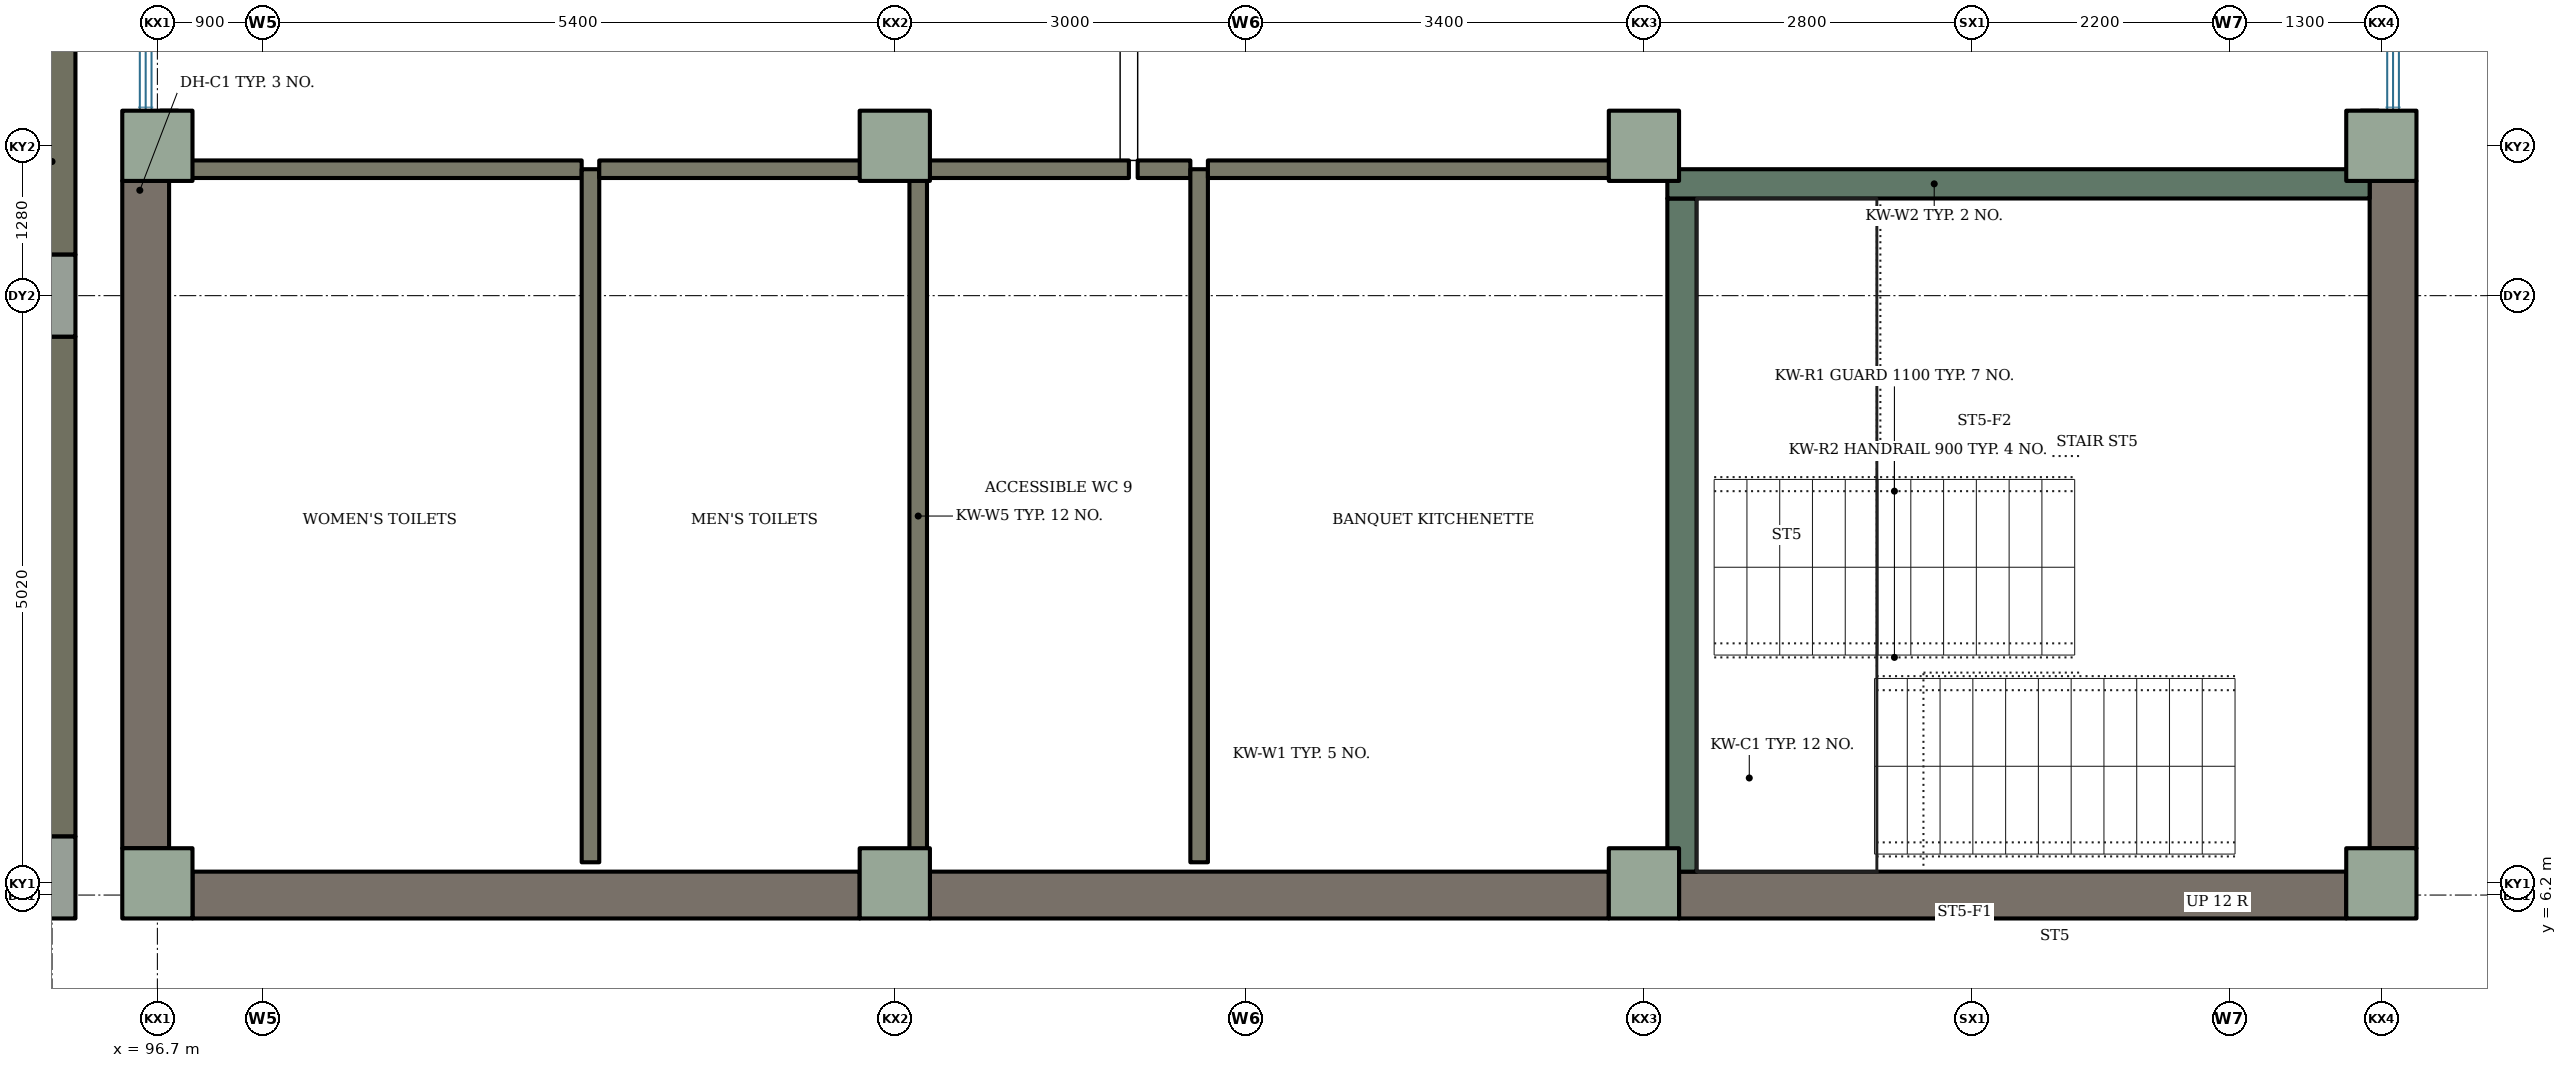
"""IFC4 building model, lengths in metres.
Left out: names, types, materials, properties, quantities, classifications, styles, units other than length and angle.
Written with IfcOpenShell. Run it as: python <this file> out.ifc"""

import sys

from ifc_helpers import new_model, si_unit, direction, frame, frame_2d, origin, origin_2d, place, context, subcontext, project, spatial, rectangle, extrude, element, fill, save


model = new_model("IFC4")
c1 = context("Model", 3, precision=1e-05, world=origin(), true_north=direction((0.0, 1.0)))
c2 = subcontext(c1, "Body", "Model", "MODEL_VIEW")
j1 = project(units=[si_unit("LENGTHUNIT", "METRE"), si_unit("PLANEANGLEUNIT", "RADIAN")], contexts=[c1])
p1 = place(None, origin())
s1 = spatial("IfcSite", under=j1, at=p1, CompositionType="ELEMENT")
p2 = place(p1, origin())
s2 = spatial("IfcBuilding", under=s1, at=p2, CompositionType="ELEMENT")
p3 = place(p2, frame((0.0, 0.0, 4.2)))
s3 = spatial("IfcBuildingStorey", under=s2, at=p3, CompositionType="ELEMENT", Elevation=4.2)
for number, where, z_axis, x_axis in (
    (1, (95.65, 6.35, 0.0), (0.0, 0.0, 1.0), (1.0, 0.0, 0.0)),
    (2, (95.65, 11.32, 0.0), (0.0, 0.0, 1.0), (1.0, 0.0, 0.0)),
):
    element("IfcColumn", number, at=place(p3, frame(where, z_axis=z_axis, x_axis=x_axis)), inside=s3, PredefinedType="COLUMN", context=c2, shape_type="SweptSolid", body=[
        extrude(rectangle(XDim=0.7, YDim=0.7, at=origin_2d()), origin(), (0.0, 0.0, 1.0), 4.2),
    ])
p4 = place(p3, frame((95.8, 6.7, 0.0), z_axis=(0.0, 0.0, 1.0), x_axis=(0.0, 1.0, 0.0)))
e3 = element("IfcWall", 3, at=p4, inside=s3, PredefinedType="SOLIDWALL", context=c2, shape_type="SweptSolid", body=[
    extrude(rectangle(XDim=4.27, YDim=0.4, at=frame_2d((2.135, 0.0))), origin(), (0.0, 0.0, 1.0), 4.2),
])
p5 = place(p4, frame((1.635, 0.0, 0.6)))
e4 = element("IfcOpeningElement", 4, at=p5, cuts=e3, PredefinedType="OPENING", context=c2, shape_type="SweptSolid", body=[
    extrude(rectangle(XDim=1.0, YDim=2.4, at=frame_2d((0.5, 1.2))), frame((0.0, 0.21, 0.0), z_axis=(0.0, -1.0, 0.0), x_axis=(1.0, 0.0, 0.0)), (0.0, 0.0, 1.0), 0.42),
])
p6 = place(p3, frame((95.8, 11.67, 0.0), z_axis=(0.0, 0.0, 1.0), x_axis=(0.0, 1.0, 0.0)))
e5 = element("IfcWall", 5, at=p6, inside=s3, PredefinedType="SOLIDWALL", context=c2, shape_type="SweptSolid", body=[
    extrude(rectangle(XDim=4.42, YDim=0.4, at=frame_2d((2.21, 0.0))), origin(), (0.0, 0.0, 1.0), 4.2),
])
p7 = place(p6, frame((1.71, 0.0, 0.6)))
e6 = element("IfcOpeningElement", 6, at=p7, cuts=e5, PredefinedType="OPENING", context=c2, shape_type="SweptSolid", body=[
    extrude(rectangle(XDim=1.0, YDim=2.4, at=frame_2d((0.5, 1.2))), frame((0.0, 0.21, 0.0), z_axis=(0.0, -1.0, 0.0), x_axis=(1.0, 0.0, 0.0)), (0.0, 0.0, 1.0), 0.42),
])
for number, where, z_axis, x_axis in (
    (7, (96.7, 6.3, 0.0), (0.0, 0.0, 1.0), (1.0, 0.0, 0.0)),
    (8, (96.7, 12.6, 0.0), (0.0, 0.0, 1.0), (1.0, 0.0, 0.0)),
    (9, (103.0, 6.3, 0.0), (0.0, 0.0, 1.0), (1.0, 0.0, 0.0)),
    (10, (103.0, 12.6, 0.0), (0.0, 0.0, 1.0), (1.0, 0.0, 0.0)),
    (11, (109.4, 6.3, 0.0), (0.0, 0.0, 1.0), (1.0, 0.0, 0.0)),
    (12, (109.4, 12.6, 0.0), (0.0, 0.0, 1.0), (1.0, 0.0, 0.0)),
    (13, (115.7, 6.3, 0.0), (0.0, 0.0, 1.0), (1.0, 0.0, 0.0)),
    (14, (115.7, 12.6, 0.0), (0.0, 0.0, 1.0), (1.0, 0.0, 0.0)),
):
    element("IfcColumn", number, at=place(p3, frame(where, z_axis=z_axis, x_axis=x_axis)), inside=s3, PredefinedType="COLUMN", context=c2, shape_type="SweptSolid", body=[
        extrude(rectangle(XDim=0.6, YDim=0.6, at=origin_2d()), origin(), (0.0, 0.0, 1.0), 4.2),
    ])
p8 = place(p3, frame((97.0, 6.2, 0.0), z_axis=(0.0, 0.0, 1.0), x_axis=(1.0, 0.0, 0.0)))
e15 = element("IfcWall", 15, at=p8, inside=s3, PredefinedType="SOLIDWALL", context=c2, shape_type="SweptSolid", body=[
    extrude(rectangle(XDim=5.7, YDim=0.4, at=frame_2d((2.85, 0.0))), origin(), (0.0, 0.0, 1.0), 4.2),
])
p9 = place(p8, frame((1.225, 0.0, 1.4)))
e16 = element("IfcOpeningElement", 16, at=p9, cuts=e15, PredefinedType="OPENING", context=c2, shape_type="SweptSolid", body=[
    extrude(rectangle(XDim=0.75, YDim=1.5, at=frame_2d((0.375, 0.75))), frame((0.0, 0.21, 0.0), z_axis=(0.0, -1.0, 0.0), x_axis=(1.0, 0.0, 0.0)), (0.0, 0.0, 1.0), 0.42),
])
p10 = place(p8, frame((4.425, 0.0, 1.4)))
e17 = element("IfcOpeningElement", 17, at=p10, cuts=e15, PredefinedType="OPENING", context=c2, shape_type="SweptSolid", body=[
    extrude(rectangle(XDim=0.75, YDim=1.5, at=frame_2d((0.375, 0.75))), frame((0.0, 0.21, 0.0), z_axis=(0.0, -1.0, 0.0), x_axis=(1.0, 0.0, 0.0)), (0.0, 0.0, 1.0), 0.42),
])
p11 = place(p3, frame((103.3, 6.2, 0.0), z_axis=(0.0, 0.0, 1.0), x_axis=(1.0, 0.0, 0.0)))
e18 = element("IfcWall", 18, at=p11, inside=s3, PredefinedType="SOLIDWALL", context=c2, shape_type="SweptSolid", body=[
    extrude(rectangle(XDim=5.8, YDim=0.4, at=frame_2d((2.9, 0.0))), origin(), (0.0, 0.0, 1.0), 4.2),
])
p12 = place(p11, frame((1.7, 0.0, 0.9)))
e19 = element("IfcOpeningElement", 19, at=p12, cuts=e18, PredefinedType="OPENING", context=c2, shape_type="SweptSolid", body=[
    extrude(rectangle(XDim=2.4, YDim=2.7, at=frame_2d((1.2, 1.35))), frame((0.0, 0.21, 0.0), z_axis=(0.0, -1.0, 0.0), x_axis=(1.0, 0.0, 0.0)), (0.0, 0.0, 1.0), 0.42),
])
for number, where, z_axis, x_axis in (
    (20, (109.7, 6.2, 0.0), (0.0, 0.0, 1.0), (1.0, 0.0, 0.0)),
    (21, (96.6, 6.6, 0.0), (0.0, 0.0, 1.0), (0.0, 1.0, 0.0)),
):
    element("IfcWall", number, at=place(p3, frame(where, z_axis=z_axis, x_axis=x_axis)), inside=s3, PredefinedType="SOLIDWALL", context=c2, shape_type="SweptSolid", body=[
        extrude(rectangle(XDim=5.7, YDim=0.4, at=frame_2d((2.85, 0.0))), origin(), (0.0, 0.0, 1.0), 4.2),
    ])
p13 = place(p3, frame((115.8, 12.3, 0.0), z_axis=(0.0, 0.0, 1.0), x_axis=(0.0, -1.0, 0.0)))
e22 = element("IfcWall", 22, at=p13, inside=s3, PredefinedType="SOLIDWALL", context=c2, shape_type="SweptSolid", body=[
    extrude(rectangle(XDim=5.7, YDim=0.4, at=frame_2d((2.85, 0.0))), origin(), (0.0, 0.0, 1.0), 4.2),
])
p14 = place(p13, frame((2.35, 0.0, 0.9)))
e23 = element("IfcOpeningElement", 23, at=p14, cuts=e22, PredefinedType="OPENING", context=c2, shape_type="SweptSolid", body=[
    extrude(rectangle(XDim=1.0, YDim=1.5, at=frame_2d((0.5, 0.75))), frame((0.0, 0.21, 0.0), z_axis=(0.0, -1.0, 0.0), x_axis=(1.0, 0.0, 0.0)), (0.0, 0.0, 1.0), 0.42),
])
p15 = place(p3, frame((109.725, 6.4, 0.0), z_axis=(0.0, 0.0, 1.0), x_axis=(0.0, 1.0, 0.0)))
e24 = element("IfcWall", 24, at=p15, inside=s3, PredefinedType="SHEAR", context=c2, shape_type="SweptSolid", body=[
    extrude(rectangle(XDim=5.75, YDim=0.25, at=frame_2d((2.875, 0.0))), origin(), (0.0, 0.0, 1.0), 4.2),
])
p16 = place(p3, frame((109.6, 12.275, 0.0), z_axis=(0.0, 0.0, 1.0), x_axis=(1.0, 0.0, 0.0)))
e25 = element("IfcWall", 25, at=p16, inside=s3, PredefinedType="SHEAR", context=c2, shape_type="SweptSolid", body=[
    extrude(rectangle(XDim=6.0, YDim=0.25, at=frame_2d((3.0, 0.0))), origin(), (0.0, 0.0, 1.0), 4.2),
])
p17 = place(p16, frame((3.75, 0.0, 0.0)))
e26 = element("IfcOpeningElement", 26, at=p17, cuts=e25, PredefinedType="OPENING", context=c2, shape_type="SweptSolid", body=[
    extrude(rectangle(XDim=1.8, YDim=2.1, at=frame_2d((0.9, 1.05))), frame((0.0, 0.135, 0.0), z_axis=(0.0, -1.0, 0.0), x_axis=(1.0, 0.0, 0.0)), (0.0, 0.0, 1.0), 0.27),
])
p18 = place(p3, frame((96.8, 12.9, 0.0), z_axis=(0.0, 0.0, 1.0), x_axis=(0.0, -1.0, 0.0)))
e27 = element("IfcWall", 27, at=p18, inside=s3, PredefinedType="PARTITIONING", context=c2, shape_type="SweptSolid", body=[
    extrude(rectangle(XDim=0.5, YDim=0.15, at=frame_2d((0.25, 0.0))), origin(), (0.0, 0.0, 1.0), 3.92),
])
p19 = place(p3, frame((100.325, 12.4, 0.0), z_axis=(0.0, 0.0, 1.0), x_axis=(-1.0, 0.0, 0.0)))
e28 = element("IfcWall", 28, at=p19, inside=s3, PredefinedType="PARTITIONING", context=c2, shape_type="SweptSolid", body=[
    extrude(rectangle(XDim=3.45, YDim=0.15, at=frame_2d((1.725, 0.0))), origin(), (0.0, 0.0, 1.0), 3.92),
])
p20 = place(p19, frame((1.275, 0.0, 0.0)))
e29 = element("IfcOpeningElement", 29, at=p20, cuts=e28, PredefinedType="OPENING", context=c2, shape_type="SweptSolid", body=[
    extrude(rectangle(XDim=0.9, YDim=2.1, at=frame_2d((0.45, 1.05))), frame((0.0, 0.085, 0.0), z_axis=(0.0, -1.0, 0.0), x_axis=(1.0, 0.0, 0.0)), (0.0, 0.0, 1.0), 0.17),
])
p21 = place(p3, frame((100.4, 6.48, 0.0), z_axis=(0.0, 0.0, 1.0), x_axis=(0.0, 1.0, 0.0)))
e30 = element("IfcWall", 30, at=p21, inside=s3, PredefinedType="PARTITIONING", context=c2, shape_type="SweptSolid", body=[
    extrude(rectangle(XDim=5.92, YDim=0.15, at=frame_2d((2.96, 0.0))), origin(), (0.0, 0.0, 1.0), 3.92),
])
p22 = place(p3, frame((102.78, 6.4, 0.0), z_axis=(0.0, 0.0, 1.0), x_axis=(1.0, 0.0, 0.0)))
e31 = element("IfcWall", 31, at=p22, inside=s3, PredefinedType="PARTITIONING", context=c2, shape_type="SweptSolid", body=[
    extrude(rectangle(XDim=0.42, YDim=0.15, at=frame_2d((0.21, 0.0))), origin(), (0.0, 0.0, 1.0), 3.92),
])
p23 = place(p3, frame((103.125, 12.4, 0.0), z_axis=(0.0, 0.0, 1.0), x_axis=(-1.0, 0.0, 0.0)))
e32 = element("IfcWall", 32, at=p23, inside=s3, PredefinedType="PARTITIONING", context=c2, shape_type="SweptSolid", body=[
    extrude(rectangle(XDim=2.65, YDim=0.15, at=frame_2d((1.325, 0.0))), origin(), (0.0, 0.0, 1.0), 3.92),
])
p24 = place(p23, frame((0.875, 0.0, 0.0)))
e33 = element("IfcOpeningElement", 33, at=p24, cuts=e32, PredefinedType="OPENING", context=c2, shape_type="SweptSolid", body=[
    extrude(rectangle(XDim=0.9, YDim=2.1, at=frame_2d((0.45, 1.05))), frame((0.0, 0.085, 0.0), z_axis=(0.0, -1.0, 0.0), x_axis=(1.0, 0.0, 0.0)), (0.0, 0.0, 1.0), 0.17),
])
p25 = place(p3, frame((103.2, 6.475, 0.0), z_axis=(0.0, 0.0, 1.0), x_axis=(0.0, 1.0, 0.0)))
e34 = element("IfcWall", 34, at=p25, inside=s3, PredefinedType="PARTITIONING", context=c2, shape_type="SweptSolid", body=[
    extrude(rectangle(XDim=5.925, YDim=0.15, at=frame_2d((2.962, 0.0))), origin(), (0.0, 0.0, 1.0), 3.92),
])
p26 = place(p3, frame((105.0, 12.4, 0.0), z_axis=(0.0, 0.0, 1.0), x_axis=(-1.0, 0.0, 0.0)))
e35 = element("IfcWall", 35, at=p26, inside=s3, PredefinedType="PARTITIONING", context=c2, shape_type="SweptSolid", body=[
    extrude(rectangle(XDim=1.725, YDim=0.15, at=frame_2d((0.863, 0.0))), origin(), (0.0, 0.0, 1.0), 3.92),
])
p27 = place(p26, frame((0.45, 0.0, 0.0)))
e36 = element("IfcOpeningElement", 36, at=p27, cuts=e35, PredefinedType="OPENING", context=c2, shape_type="SweptSolid", body=[
    extrude(rectangle(XDim=0.9, YDim=2.1, at=frame_2d((0.45, 1.05))), frame((0.0, 0.085, 0.0), z_axis=(0.0, -1.0, 0.0), x_axis=(1.0, 0.0, 0.0)), (0.0, 0.0, 1.0), 0.17),
])
p28 = place(p3, frame((105.0, 12.475, 0.0), z_axis=(0.0, 0.0, 1.0), x_axis=(0.0, 1.0, 0.0)))
e37 = element("IfcWall", 37, at=p28, inside=s3, PredefinedType="PARTITIONING", context=c2, shape_type="SweptSolid", body=[
    extrude(rectangle(XDim=19.045, YDim=0.15, at=frame_2d((9.522, 0.0))), origin(), (0.0, 0.0, 1.0), 3.92),
])
p29 = place(p28, frame((8.575, 0.0, 0.0)))
e38 = element("IfcOpeningElement", 38, at=p29, cuts=e37, PredefinedType="OPENING", context=c2, shape_type="SweptSolid", body=[
    extrude(rectangle(XDim=1.8, YDim=2.1, at=frame_2d((0.9, 1.05))), frame((0.0, 0.085, 0.0), z_axis=(0.0, -1.0, 0.0), x_axis=(1.0, 0.0, 0.0)), (0.0, 0.0, 1.0), 0.17),
])
p30 = place(p3, frame((105.525, 12.4, 0.0), z_axis=(0.0, 0.0, 1.0), x_axis=(-1.0, 0.0, 0.0)))
e39 = element("IfcWall", 39, at=p30, inside=s3, PredefinedType="PARTITIONING", context=c2, shape_type="SweptSolid", body=[
    extrude(rectangle(XDim=0.45, YDim=0.15, at=frame_2d((0.225, 0.0))), origin(), (0.0, 0.0, 1.0), 3.92),
])
p31 = place(p3, frame((105.6, 6.48, 0.0), z_axis=(0.0, 0.0, 1.0), x_axis=(0.0, 1.0, 0.0)))
e40 = element("IfcWall", 40, at=p31, inside=s3, PredefinedType="PARTITIONING", context=c2, shape_type="SweptSolid", body=[
    extrude(rectangle(XDim=5.92, YDim=0.15, at=frame_2d((2.96, 0.0))), origin(), (0.0, 0.0, 1.0), 3.92),
])
p32 = place(p3, frame((109.18, 6.4, 0.0), z_axis=(0.0, 0.0, 1.0), x_axis=(1.0, 0.0, 0.0)))
e41 = element("IfcWall", 41, at=p32, inside=s3, PredefinedType="PARTITIONING", context=c2, shape_type="SweptSolid", body=[
    extrude(rectangle(XDim=0.34, YDim=0.15, at=frame_2d((0.17, 0.0))), origin(), (0.0, 0.0, 1.0), 3.92),
])
p33 = place(p3, frame((109.52, 12.4, 0.0), z_axis=(0.0, 0.0, 1.0), x_axis=(-1.0, 0.0, 0.0)))
e42 = element("IfcWall", 42, at=p33, inside=s3, PredefinedType="PARTITIONING", context=c2, shape_type="SweptSolid", body=[
    extrude(rectangle(XDim=3.845, YDim=0.15, at=frame_2d((1.922, 0.0))), origin(), (0.0, 0.0, 1.0), 3.92),
])
p34 = place(p33, frame((1.07, 0.0, 0.0)))
e43 = element("IfcOpeningElement", 43, at=p34, cuts=e42, PredefinedType="OPENING", context=c2, shape_type="SweptSolid", body=[
    extrude(rectangle(XDim=1.8, YDim=2.1, at=frame_2d((0.9, 1.05))), frame((0.0, 0.085, 0.0), z_axis=(0.0, -1.0, 0.0), x_axis=(1.0, 0.0, 0.0)), (0.0, 0.0, 1.0), 0.17),
])
p35 = place(p3, frame((115.6, 12.9, 0.0), z_axis=(0.0, 0.0, 1.0), x_axis=(0.0, -1.0, 0.0)))
e44 = element("IfcWall", 44, at=p35, inside=s3, PredefinedType="PARTITIONING", context=c2, shape_type="SweptSolid", body=[
    extrude(rectangle(XDim=0.42, YDim=0.15, at=frame_2d((0.21, 0.0))), origin(), (0.0, 0.0, 1.0), 3.92),
])
p36 = place(p5, origin())
e45 = element("IfcWindow", 45, at=p36, inside=s3, PartitioningType="SINGLE_PANEL", PredefinedType="WINDOW", context=c2, shape_type="SweptSolid", body=[
    extrude(rectangle(XDim=1.0, YDim=2.4, at=frame_2d((0.5, 1.2))), frame((0.0, 0.03, 0.0), z_axis=(0.0, -1.0, 0.0), x_axis=(1.0, 0.0, 0.0)), (0.0, 0.0, 1.0), 0.06),
])
fill(e4, e45)
p37 = place(p7, origin())
e46 = element("IfcWindow", 46, at=p37, inside=s3, PartitioningType="SINGLE_PANEL", PredefinedType="WINDOW", context=c2, shape_type="SweptSolid", body=[
    extrude(rectangle(XDim=1.0, YDim=2.4, at=frame_2d((0.5, 1.2))), frame((0.0, 0.03, 0.0), z_axis=(0.0, -1.0, 0.0), x_axis=(1.0, 0.0, 0.0)), (0.0, 0.0, 1.0), 0.06),
])
fill(e6, e46)
p38 = place(p14, origin())
e47 = element("IfcWindow", 47, at=p38, inside=s3, PartitioningType="SINGLE_PANEL", PredefinedType="WINDOW", context=c2, shape_type="SweptSolid", body=[
    extrude(rectangle(XDim=1.0, YDim=1.5, at=frame_2d((0.5, 0.75))), frame((0.0, 0.03, 0.0), z_axis=(0.0, -1.0, 0.0), x_axis=(1.0, 0.0, 0.0)), (0.0, 0.0, 1.0), 0.06),
])
fill(e23, e47)
p39 = place(p9, origin())
e48 = element("IfcWindow", 48, at=p39, inside=s3, PartitioningType="SINGLE_PANEL", PredefinedType="WINDOW", context=c2, shape_type="SweptSolid", body=[
    extrude(rectangle(XDim=0.75, YDim=1.5, at=frame_2d((0.375, 0.75))), frame((0.0, 0.03, 0.0), z_axis=(0.0, -1.0, 0.0), x_axis=(1.0, 0.0, 0.0)), (0.0, 0.0, 1.0), 0.06),
])
fill(e16, e48)
p40 = place(p10, origin())
e49 = element("IfcWindow", 49, at=p40, inside=s3, PartitioningType="SINGLE_PANEL", PredefinedType="WINDOW", context=c2, shape_type="SweptSolid", body=[
    extrude(rectangle(XDim=0.75, YDim=1.5, at=frame_2d((0.375, 0.75))), frame((0.0, 0.03, 0.0), z_axis=(0.0, -1.0, 0.0), x_axis=(1.0, 0.0, 0.0)), (0.0, 0.0, 1.0), 0.06),
])
fill(e17, e49)
p41 = place(p12, origin())
e50 = element("IfcWindow", 50, at=p41, inside=s3, PartitioningType="SINGLE_PANEL", PredefinedType="WINDOW", context=c2, shape_type="SweptSolid", body=[
    extrude(rectangle(XDim=2.4, YDim=2.7, at=frame_2d((1.2, 1.35))), frame((0.0, 0.03, 0.0), z_axis=(0.0, -1.0, 0.0), x_axis=(1.0, 0.0, 0.0)), (0.0, 0.0, 1.0), 0.06),
])
fill(e19, e50)
p42 = place(p20, origin())
e51 = element("IfcDoor", 51, at=p42, inside=s3, OperationType="SINGLE_SWING_LEFT", PredefinedType="DOOR", context=c2, shape_type="SweptSolid", body=[
    extrude(rectangle(XDim=0.9, YDim=2.1, at=frame_2d((0.45, 1.05))), frame((0.0, 0.025, 0.0), z_axis=(0.0, -1.0, 0.0), x_axis=(1.0, 0.0, 0.0)), (0.0, 0.0, 1.0), 0.05),
])
fill(e29, e51)
p43 = place(p24, origin())
e52 = element("IfcDoor", 52, at=p43, inside=s3, OperationType="SINGLE_SWING_LEFT", PredefinedType="DOOR", context=c2, shape_type="SweptSolid", body=[
    extrude(rectangle(XDim=0.9, YDim=2.1, at=frame_2d((0.45, 1.05))), frame((0.0, 0.025, 0.0), z_axis=(0.0, -1.0, 0.0), x_axis=(1.0, 0.0, 0.0)), (0.0, 0.0, 1.0), 0.05),
])
fill(e33, e52)
p44 = place(p27, origin())
e53 = element("IfcDoor", 53, at=p44, inside=s3, OperationType="SINGLE_SWING_LEFT", PredefinedType="DOOR", context=c2, shape_type="SweptSolid", body=[
    extrude(rectangle(XDim=0.9, YDim=2.1, at=frame_2d((0.45, 1.05))), frame((0.0, 0.025, 0.0), z_axis=(0.0, -1.0, 0.0), x_axis=(1.0, 0.0, 0.0)), (0.0, 0.0, 1.0), 0.05),
])
fill(e36, e53)
p45 = place(p34, origin())
e54 = element("IfcDoor", 54, at=p45, inside=s3, OperationType="DOUBLE_DOOR_SINGLE_SWING", PredefinedType="DOOR", context=c2, shape_type="SweptSolid", body=[
    extrude(rectangle(XDim=1.8, YDim=2.1, at=frame_2d((0.9, 1.05))), frame((0.0, 0.025, 0.0), z_axis=(0.0, -1.0, 0.0), x_axis=(1.0, 0.0, 0.0)), (0.0, 0.0, 1.0), 0.05),
])
fill(e43, e54)
p46 = place(p17, origin())
e55 = element("IfcDoor", 55, at=p46, inside=s3, OperationType="DOUBLE_DOOR_SINGLE_SWING", PredefinedType="DOOR", context=c2, shape_type="SweptSolid", body=[
    extrude(rectangle(XDim=1.8, YDim=2.1, at=frame_2d((0.9, 1.05))), frame((0.0, 0.025, 0.0), z_axis=(0.0, -1.0, 0.0), x_axis=(1.0, 0.0, 0.0)), (0.0, 0.0, 1.0), 0.05),
])
fill(e26, e55)
save(model, sys.argv[1])
